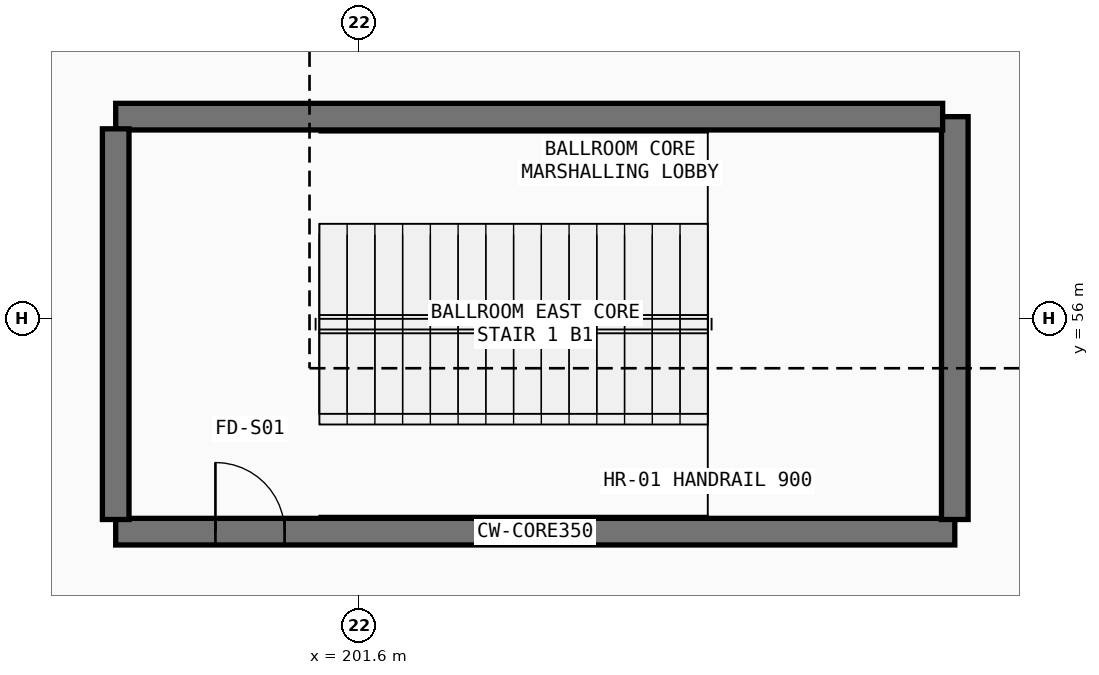
"""IFC4 building model, lengths in metres.
Left out: names, types, materials, properties, quantities, classifications, styles, units other than length and angle.
Written with IfcOpenShell. Run it as: python <this file> out.ifc"""

import sys

from ifc_helpers import new_model, si_unit, direction, frame, frame_2d, origin, place, context, subcontext, project, spatial, rectangle, extrude, element, fill, save


model = new_model("IFC4")
c1 = context("Model", 3, precision=1e-05, world=origin(), true_north=direction((0.0, 1.0)))
c2 = subcontext(c1, "Body", "Model", "MODEL_VIEW")
j1 = project(units=[si_unit("LENGTHUNIT", "METRE"), si_unit("PLANEANGLEUNIT", "RADIAN")], contexts=[c1])
p1 = place(None, origin())
s1 = spatial("IfcSite", under=j1, at=p1, CompositionType="ELEMENT")
p2 = place(p1, origin())
s2 = spatial("IfcBuilding", under=s1, at=p2, CompositionType="ELEMENT")
p3 = place(p2, frame((0.0, 0.0, -5.4)))
s3 = spatial("IfcBuildingStorey", under=s2, at=p3, CompositionType="ELEMENT", Elevation=-5.4)
p4 = place(p3, frame((198.4, 53.2, 0.0), z_axis=(0.0, 0.0, 1.0), x_axis=(1.0, 0.0, 0.0)))
e1 = element("IfcWall", 1, at=p4, inside=s3, PredefinedType="SHEAR", context=c2, shape_type="SweptSolid", body=[
    extrude(rectangle(XDim=11.04, YDim=0.35, at=frame_2d((5.52, 0.0))), origin(), (0.0, 0.0, 1.0), 5.04),
])
p5 = place(p4, frame((1.312, 0.0, 0.0)))
e2 = element("IfcOpeningElement", 2, at=p5, cuts=e1, PredefinedType="OPENING", context=c2, shape_type="SweptSolid", body=[
    extrude(rectangle(XDim=0.91, YDim=2.08, at=frame_2d((0.455, 1.04))), frame((0.0, 0.185, 0.0), z_axis=(0.0, -1.0, 0.0), x_axis=(1.0, 0.0, 0.0)), (0.0, 0.0, 1.0), 0.37),
])
p6 = place(p3, frame((209.44, 53.36, 0.0), z_axis=(0.0, 0.0, 1.0), x_axis=(0.0, 1.0, 0.0)))
e3 = element("IfcWall", 3, at=p6, inside=s3, PredefinedType="SHEAR", context=c2, shape_type="SweptSolid", body=[
    extrude(rectangle(XDim=5.3, YDim=0.35, at=frame_2d((2.65, 0.0))), origin(), (0.0, 0.0, 1.0), 5.04),
])
p7 = place(p3, frame((209.28, 58.66, 0.0), z_axis=(0.0, 0.0, 1.0), x_axis=(-1.0, 0.0, 0.0)))
e4 = element("IfcWall", 4, at=p7, inside=s3, PredefinedType="SHEAR", context=c2, shape_type="SweptSolid", body=[
    extrude(rectangle(XDim=10.88, YDim=0.35, at=frame_2d((5.44, 0.0))), origin(), (0.0, 0.0, 1.0), 5.04),
])
p8 = place(p3, frame((198.4, 58.5, 0.0), z_axis=(0.0, 0.0, 1.0), x_axis=(0.0, -1.0, 0.0)))
e5 = element("IfcWall", 5, at=p8, inside=s3, PredefinedType="SHEAR", context=c2, shape_type="SweptSolid", body=[
    extrude(rectangle(XDim=5.14, YDim=0.35, at=frame_2d((2.57, 0.0))), origin(), (0.0, 0.0, 1.0), 5.04),
])
p9 = place(p5, origin())
e6 = element("IfcDoor", 6, at=p9, inside=s3, OperationType="SINGLE_SWING_RIGHT", PredefinedType="DOOR", context=c2, shape_type="SweptSolid", body=[
    extrude(rectangle(XDim=0.91, YDim=2.08, at=frame_2d((0.455, 1.04))), frame((0.0, 0.025, 0.0), z_axis=(0.0, -1.0, 0.0), x_axis=(1.0, 0.0, 0.0)), (0.0, 0.0, 1.0), 0.05),
])
fill(e2, e6)
save(model, sys.argv[1])
